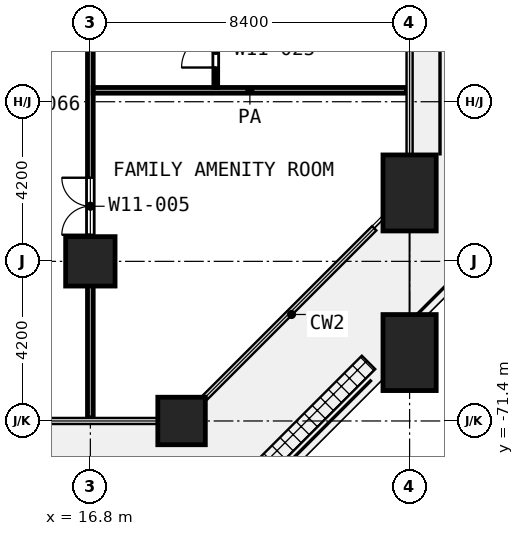
"""IFC4 building model, lengths in metres.
Left out: names, types, materials, properties, quantities, classifications, styles, units other than length and angle.
Written with IfcOpenShell. Run it as: python <this file> out.ifc"""

import sys

from ifc_helpers import new_model, si_unit, direction, frame, frame_2d, origin, origin_2d, place, context, subcontext, project, spatial, rectangle, extrude, element, fill, save


model = new_model("IFC4")
c1 = context("Model", 3, precision=1e-05, world=origin(), true_north=direction((0.0, 1.0)))
c2 = subcontext(c1, "Body", "Model", "MODEL_VIEW")
j1 = project(units=[si_unit("LENGTHUNIT", "METRE"), si_unit("PLANEANGLEUNIT", "RADIAN")], contexts=[c1])
p1 = place(None, origin())
s1 = spatial("IfcSite", under=j1, at=p1, CompositionType="ELEMENT")
p2 = place(p1, origin())
s2 = spatial("IfcBuilding", under=s1, at=p2, CompositionType="ELEMENT")
p3 = place(p2, frame((0.0, 0.0, 51.8)))
s3 = spatial("IfcBuildingStorey", under=s2, at=p3, CompositionType="ELEMENT", Elevation=51.8)
p4 = place(p3, frame((25.2, -65.4, 0.0), z_axis=(0.0, 0.0, 1.0), x_axis=(0.0, -1.0, 0.0)))
e1 = element("IfcColumn", 1, at=p4, inside=s3, PredefinedType="COLUMN", context=c2, shape_type="SweptSolid", body=[
    extrude(rectangle(XDim=2.0, YDim=1.4, at=origin_2d()), origin(), (0.0, 0.0, 1.0), 4.2),
])
p5 = place(p3, frame((16.8, -67.2, 0.0), z_axis=(0.0, 0.0, 1.0), x_axis=(1.0, 0.0, 0.0)))
e2 = element("IfcColumn", 2, at=p5, inside=s3, PredefinedType="COLUMN", context=c2, shape_type="SweptSolid", body=[
    extrude(rectangle(XDim=1.3, YDim=1.3, at=origin_2d()), origin(), (0.0, 0.0, 1.0), 4.2),
])
p6 = place(p3, frame((19.2, -71.4, 0.0), z_axis=(0.0, 0.0, 1.0), x_axis=(1.0, 0.0, 0.0)))
e3 = element("IfcColumn", 3, at=p6, inside=s3, PredefinedType="COLUMN", context=c2, shape_type="SweptSolid", body=[
    extrude(rectangle(XDim=1.25, YDim=1.25, at=origin_2d()), origin(), (0.0, 0.0, 1.0), 4.2),
])
p7 = place(p3, frame((25.2, -69.6, 0.0), z_axis=(0.0, 0.0, 1.0), x_axis=(0.0, -1.0, 0.0)))
e4 = element("IfcColumn", 4, at=p7, inside=s3, PredefinedType="COLUMN", context=c2, shape_type="SweptSolid", body=[
    extrude(rectangle(XDim=2.0, YDim=1.4, at=origin_2d()), origin(), (0.0, 0.0, 1.0), 4.2),
])
p8 = place(p3, frame((20.1, -62.625, 0.0), z_axis=(0.0, 0.0, 1.0), x_axis=(0.0, 1.0, 0.0)))
e5 = element("IfcWall", 5, at=p8, inside=s3, PredefinedType="PARTITIONING", context=c2, shape_type="SweptSolid", body=[
    extrude(rectangle(XDim=2.025, YDim=0.1, at=frame_2d((1.012, 0.0))), origin(), (0.0, 0.0, 1.0), 3.9),
])
p9 = place(p8, frame((0.525, 0.0, 0.0)))
e6 = element("IfcOpeningElement", 6, at=p9, cuts=e5, PredefinedType="OPENING", context=c2, shape_type="SweptSolid", body=[
    extrude(rectangle(XDim=0.9, YDim=2.1, at=frame_2d((0.45, 1.05))), frame((0.0, 0.06, 0.0), z_axis=(0.0, -1.0, 0.0), x_axis=(1.0, 0.0, 0.0)), (0.0, 0.0, 1.0), 0.12),
])
p10 = place(p3, frame((16.875, -62.7, 0.0), z_axis=(0.0, 0.0, 1.0), x_axis=(1.0, 0.0, 0.0)))
e7 = element("IfcWall", 7, at=p10, inside=s3, PredefinedType="PARTITIONING", context=c2, shape_type="SweptSolid", body=[
    extrude(rectangle(XDim=8.245, YDim=0.15, at=frame_2d((4.123, 0.0))), origin(), (0.0, 0.0, 1.0), 3.9),
])
p11 = place(p3, frame((16.8, -71.32, 0.0), z_axis=(0.0, 0.0, 1.0), x_axis=(0.0, 1.0, 0.0)))
e8 = element("IfcWall", 8, at=p11, inside=s3, PredefinedType="PARTITIONING", context=c2, shape_type="SweptSolid", body=[
    extrude(rectangle(XDim=46.22, YDim=0.15, at=frame_2d((23.11, 0.0))), origin(), (0.0, 0.0, 1.0), 3.9),
])
p12 = place(p11, frame((38.42, 0.0, 0.0)))
e9 = element("IfcOpeningElement", 9, at=p12, cuts=e8, PredefinedType="OPENING", context=c2, shape_type="SweptSolid", body=[
    extrude(rectangle(XDim=1.0, YDim=2.1, at=frame_2d((0.5, 1.05))), frame((0.0, 0.085, 0.0), z_axis=(0.0, -1.0, 0.0), x_axis=(1.0, 0.0, 0.0)), (0.0, 0.0, 1.0), 0.17),
])
p13 = place(p11, frame((30.22, 0.0, 0.0)))
e10 = element("IfcOpeningElement", 10, at=p13, cuts=e8, PredefinedType="OPENING", context=c2, shape_type="SweptSolid", body=[
    extrude(rectangle(XDim=1.2, YDim=2.1, at=frame_2d((0.6, 1.05))), frame((0.0, 0.085, 0.0), z_axis=(0.0, -1.0, 0.0), x_axis=(1.0, 0.0, 0.0)), (0.0, 0.0, 1.0), 0.17),
])
p14 = place(p11, frame((27.42, 0.0, 0.0)))
e11 = element("IfcOpeningElement", 11, at=p14, cuts=e8, PredefinedType="OPENING", context=c2, shape_type="SweptSolid", body=[
    extrude(rectangle(XDim=1.2, YDim=2.1, at=frame_2d((0.6, 1.05))), frame((0.0, 0.085, 0.0), z_axis=(0.0, -1.0, 0.0), x_axis=(1.0, 0.0, 0.0)), (0.0, 0.0, 1.0), 0.17),
])
p15 = place(p11, frame((25.57, 0.0, 0.0)))
e12 = element("IfcOpeningElement", 12, at=p15, cuts=e8, PredefinedType="OPENING", context=c2, shape_type="SweptSolid", body=[
    extrude(rectangle(XDim=1.2, YDim=2.1, at=frame_2d((0.6, 1.05))), frame((0.0, 0.085, 0.0), z_axis=(0.0, -1.0, 0.0), x_axis=(1.0, 0.0, 0.0)), (0.0, 0.0, 1.0), 0.17),
])
p16 = place(p11, frame((21.62, 0.0, 0.0)))
e13 = element("IfcOpeningElement", 13, at=p16, cuts=e8, PredefinedType="OPENING", context=c2, shape_type="SweptSolid", body=[
    extrude(rectangle(XDim=1.2, YDim=2.1, at=frame_2d((0.6, 1.05))), frame((0.0, 0.085, 0.0), z_axis=(0.0, -1.0, 0.0), x_axis=(1.0, 0.0, 0.0)), (0.0, 0.0, 1.0), 0.17),
])
p17 = place(p11, frame((14.32, 0.0, 0.0)))
e14 = element("IfcOpeningElement", 14, at=p17, cuts=e8, PredefinedType="OPENING", context=c2, shape_type="SweptSolid", body=[
    extrude(rectangle(XDim=1.2, YDim=2.1, at=frame_2d((0.6, 1.05))), frame((0.0, 0.085, 0.0), z_axis=(0.0, -1.0, 0.0), x_axis=(1.0, 0.0, 0.0)), (0.0, 0.0, 1.0), 0.17),
])
p18 = place(p11, frame((18.52, 0.0, 0.0)))
e15 = element("IfcOpeningElement", 15, at=p18, cuts=e8, PredefinedType="OPENING", context=c2, shape_type="SweptSolid", body=[
    extrude(rectangle(XDim=1.2, YDim=2.1, at=frame_2d((0.6, 1.05))), frame((0.0, 0.085, 0.0), z_axis=(0.0, -1.0, 0.0), x_axis=(1.0, 0.0, 0.0)), (0.0, 0.0, 1.0), 0.17),
])
p19 = place(p11, frame((10.92, 0.0, 0.0)))
e16 = element("IfcOpeningElement", 16, at=p19, cuts=e8, PredefinedType="OPENING", context=c2, shape_type="SweptSolid", body=[
    extrude(rectangle(XDim=0.9, YDim=2.1, at=frame_2d((0.45, 1.05))), frame((0.0, 0.085, 0.0), z_axis=(0.0, -1.0, 0.0), x_axis=(1.0, 0.0, 0.0)), (0.0, 0.0, 1.0), 0.17),
])
p20 = place(p11, frame((4.82, 0.0, 0.0)))
e17 = element("IfcOpeningElement", 17, at=p20, cuts=e8, PredefinedType="OPENING", context=c2, shape_type="SweptSolid", body=[
    extrude(rectangle(XDim=1.5, YDim=2.1, at=frame_2d((0.75, 1.05))), frame((0.0, 0.085, 0.0), z_axis=(0.0, -1.0, 0.0), x_axis=(1.0, 0.0, 0.0)), (0.0, 0.0, 1.0), 0.17),
])
p21 = place(p9, origin())
e18 = element("IfcDoor", 18, at=p21, inside=s3, OperationType="SINGLE_SWING_LEFT", PredefinedType="DOOR", context=c2, shape_type="SweptSolid", body=[
    extrude(rectangle(XDim=0.9, YDim=2.1, at=frame_2d((0.45, 1.05))), frame((0.0, 0.025, 0.0), z_axis=(0.0, -1.0, 0.0), x_axis=(1.0, 0.0, 0.0)), (0.0, 0.0, 1.0), 0.05),
])
fill(e6, e18)
p22 = place(p20, origin())
e19 = element("IfcDoor", 19, at=p22, inside=s3, OperationType="DOUBLE_DOOR_SINGLE_SWING", PredefinedType="DOOR", context=c2, shape_type="SweptSolid", body=[
    extrude(rectangle(XDim=1.5, YDim=2.1, at=frame_2d((0.75, 1.05))), frame((0.0, 0.025, 0.0), z_axis=(0.0, -1.0, 0.0), x_axis=(1.0, 0.0, 0.0)), (0.0, 0.0, 1.0), 0.05),
])
fill(e17, e19)
save(model, sys.argv[1])
